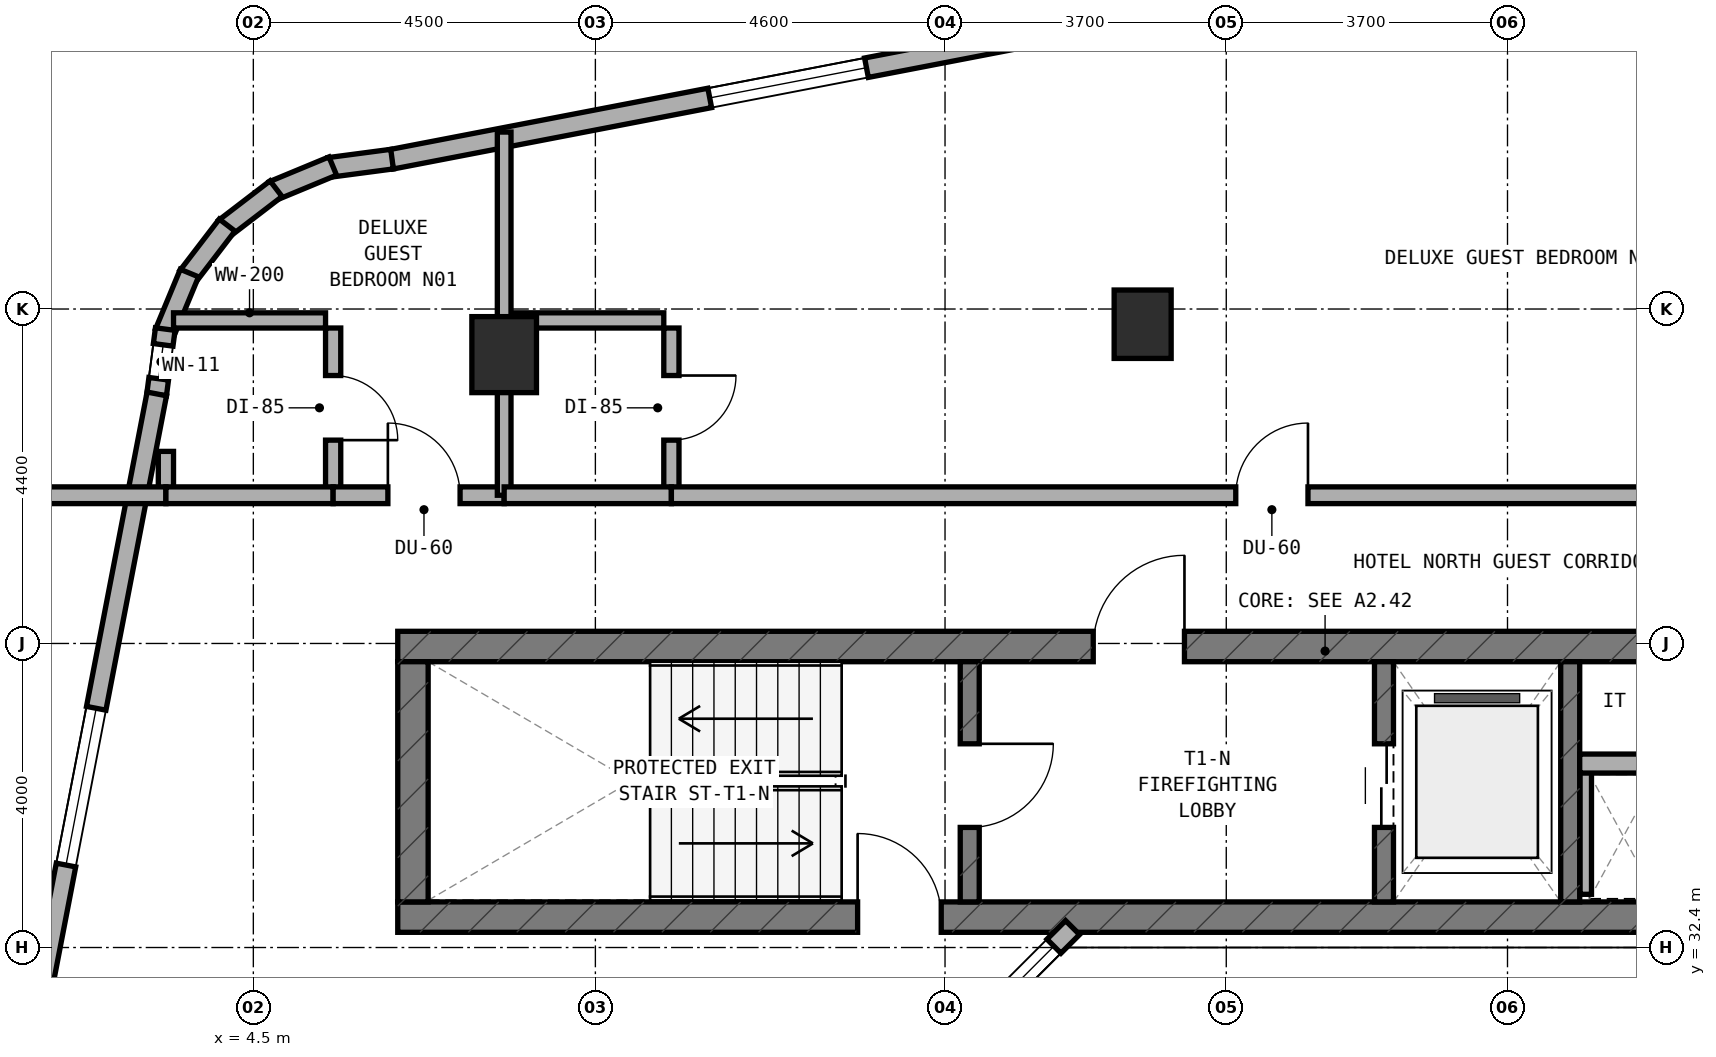
"""IFC4 building model, lengths in metres.
Left out: names, types, materials, properties, quantities, classifications, styles, units other than length and angle.
Written with IfcOpenShell. Run it as: python <this file> out.ifc"""

import sys

from ifc_helpers import new_model, si_unit, direction, frame, frame_2d, origin, origin_2d, place, context, subcontext, project, spatial, rectangle, extrude, element, fill, save


model = new_model("IFC4")
c1 = context("Model", 3, precision=1e-05, world=origin(), true_north=direction((0.0, 1.0)))
c2 = subcontext(c1, "Body", "Model", "MODEL_VIEW")
j1 = project(units=[si_unit("LENGTHUNIT", "METRE"), si_unit("PLANEANGLEUNIT", "RADIAN")], contexts=[c1])
p1 = place(None, origin())
s1 = spatial("IfcSite", under=j1, at=p1, CompositionType="ELEMENT")
p2 = place(p1, origin())
s2 = spatial("IfcBuilding", under=s1, at=p2, CompositionType="ELEMENT")
p3 = place(p2, frame((0.0, 0.0, 191.9)))
s3 = spatial("IfcBuildingStorey", under=s2, at=p3, CompositionType="ELEMENT", Elevation=191.9)
p4 = place(p3, frame((6.4, 32.8, 0.0), z_axis=(0.0, 0.0, 1.0), x_axis=(1.0, 0.0, 0.0)))
e1 = element("IfcWall", 1, at=p4, inside=s3, PredefinedType="SHEAR", context=c2, shape_type="SweptSolid", body=[
    extrude(rectangle(XDim=24.4, YDim=0.4, at=frame_2d((12.2, 0.0))), origin(), (0.0, 0.0, 1.0), 3.6),
])
p5 = place(p4, frame((6.05, 0.0, 0.0)))
e2 = element("IfcOpeningElement", 2, at=p5, cuts=e1, PredefinedType="OPENING", context=c2, shape_type="SweptSolid", body=[
    extrude(rectangle(XDim=1.1, YDim=2.15, at=frame_2d((0.55, 1.075))), frame((0.0, 0.21, 0.0), z_axis=(0.0, -1.0, 0.0), x_axis=(1.0, 0.0, 0.0)), (0.0, 0.0, 1.0), 0.42),
])
p6 = place(p3, frame((6.4, 36.36, 0.0), z_axis=(0.0, 0.0, 1.0), x_axis=(1.0, 0.0, 0.0)))
e3 = element("IfcWall", 3, at=p6, inside=s3, PredefinedType="SHEAR", context=c2, shape_type="SweptSolid", body=[
    extrude(rectangle(XDim=24.4, YDim=0.4, at=frame_2d((12.2, 0.0))), origin(), (0.0, 0.0, 1.0), 3.6),
])
p7 = place(p6, frame((9.15, 0.0, 0.0)))
e4 = element("IfcOpeningElement", 4, at=p7, cuts=e3, PredefinedType="OPENING", context=c2, shape_type="SweptSolid", body=[
    extrude(rectangle(XDim=1.2, YDim=2.15, at=frame_2d((0.6, 1.075))), frame((0.0, 0.21, 0.0), z_axis=(0.0, -1.0, 0.0), x_axis=(1.0, 0.0, 0.0)), (0.0, 0.0, 1.0), 0.42),
])
p8 = place(p6, frame((19.2, 0.0, 0.0)))
e5 = element("IfcOpeningElement", 5, at=p8, cuts=e3, PredefinedType="OPENING", context=c2, shape_type="SweptSolid", body=[
    extrude(rectangle(XDim=0.85, YDim=2.1, at=frame_2d((0.425, 1.05))), frame((0.0, 0.21, 0.0), z_axis=(0.0, -1.0, 0.0), x_axis=(1.0, 0.0, 0.0)), (0.0, 0.0, 1.0), 0.42),
])
p9 = place(p6, frame((16.94, 0.0, 0.0)))
e6 = element("IfcOpeningElement", 6, at=p9, cuts=e3, PredefinedType="OPENING", context=c2, shape_type="SweptSolid", body=[
    extrude(rectangle(XDim=0.85, YDim=2.1, at=frame_2d((0.425, 1.05))), frame((0.0, 0.21, 0.0), z_axis=(0.0, -1.0, 0.0), x_axis=(1.0, 0.0, 0.0)), (0.0, 0.0, 1.0), 0.42),
])
p10 = place(p3, frame((6.6, 33.0, 0.0), z_axis=(0.0, 0.0, 1.0), x_axis=(0.0, 1.0, 0.0)))
e7 = element("IfcWall", 7, at=p10, inside=s3, PredefinedType="SHEAR", context=c2, shape_type="SweptSolid", body=[
    extrude(rectangle(XDim=3.16, YDim=0.4, at=frame_2d((1.58, 0.0))), origin(), (0.0, 0.0, 1.0), 3.6),
])
p11 = place(p3, frame((13.925, 33.0, 0.0), z_axis=(0.0, 0.0, 1.0), x_axis=(0.0, 1.0, 0.0)))
e8 = element("IfcWall", 8, at=p11, inside=s3, PredefinedType="STANDARD", context=c2, shape_type="SweptSolid", body=[
    extrude(rectangle(XDim=3.16, YDim=0.25, at=frame_2d((1.58, 0.0))), origin(), (0.0, 0.0, 1.0), 3.32),
])
p12 = place(p11, frame((0.98, 0.0, 0.0)))
e9 = element("IfcOpeningElement", 9, at=p12, cuts=e8, PredefinedType="OPENING", context=c2, shape_type="SweptSolid", body=[
    extrude(rectangle(XDim=1.1, YDim=2.15, at=frame_2d((0.55, 1.075))), frame((0.0, 0.135, 0.0), z_axis=(0.0, -1.0, 0.0), x_axis=(1.0, 0.0, 0.0)), (0.0, 0.0, 1.0), 0.27),
])
p13 = place(p3, frame((19.375, 33.0, 0.0), z_axis=(0.0, 0.0, 1.0), x_axis=(0.0, 1.0, 0.0)))
e10 = element("IfcWall", 10, at=p13, inside=s3, PredefinedType="STANDARD", context=c2, shape_type="SweptSolid", body=[
    extrude(rectangle(XDim=3.16, YDim=0.25, at=frame_2d((1.58, 0.0))), origin(), (0.0, 0.0, 1.0), 3.32),
])
p14 = place(p13, frame((0.98, 0.0, 0.0)))
e11 = element("IfcOpeningElement", 11, at=p14, cuts=e10, PredefinedType="OPENING", context=c2, shape_type="SweptSolid", body=[
    extrude(rectangle(XDim=1.1, YDim=2.15, at=frame_2d((0.55, 1.075))), frame((0.0, 0.135, 0.0), z_axis=(0.0, -1.0, 0.0), x_axis=(1.0, 0.0, 0.0)), (0.0, 0.0, 1.0), 0.27),
])
p15 = place(p3, frame((21.825, 33.0, 0.0), z_axis=(0.0, 0.0, 1.0), x_axis=(0.0, 1.0, 0.0)))
e12 = element("IfcWall", 12, at=p15, inside=s3, PredefinedType="STANDARD", context=c2, shape_type="SweptSolid", body=[
    extrude(rectangle(XDim=3.16, YDim=0.25, at=frame_2d((1.58, 0.0))), origin(), (0.0, 0.0, 1.0), 3.32),
])
p16 = place(p3, frame((16.2, 40.6, 0.0), z_axis=(0.0, 0.0, 1.0), x_axis=(1.0, 0.0, 0.0)))
e13 = element("IfcColumn", 13, at=p16, inside=s3, PredefinedType="COLUMN", context=c2, shape_type="SweptSolid", body=[
    extrude(rectangle(XDim=0.75, YDim=0.9, at=origin_2d()), origin(), (0.0, 0.0, 1.0), 3.6),
])
p17 = place(p3, frame((7.8, 40.2, 0.0), z_axis=(0.0, 0.0, 1.0), x_axis=(1.0, 0.0, 0.0)))
e14 = element("IfcColumn", 14, at=p17, inside=s3, PredefinedType="COLUMN", context=c2, shape_type="SweptSolid", body=[
    extrude(rectangle(XDim=0.85, YDim=1.0, at=origin_2d()), origin(), (0.0, 0.0, 1.0), 3.6),
])
p18 = place(p3, frame((13.515, 30.899, 0.0), z_axis=(0.0, 0.0, 1.0), x_axis=(0.707106781187, 0.707106781187, 0.0)))
e15 = element("IfcWall", 15, at=p18, inside=s3, PredefinedType="STANDARD", context=c2, shape_type="SweptSolid", body=[
    extrude(rectangle(XDim=2.493, YDim=0.26, at=frame_2d((1.247, 0.0))), origin(), (0.0, 0.0, 1.0), 3.32),
])
p19 = place(p18, frame((0.347, 0.0, 0.85)))
e16 = element("IfcOpeningElement", 16, at=p19, cuts=e15, PredefinedType="OPENING", context=c2, shape_type="SweptSolid", body=[
    extrude(rectangle(XDim=1.8, YDim=1.5, at=frame_2d((0.9, 0.75))), frame((0.0, 0.14, 0.0), z_axis=(0.0, -1.0, 0.0), x_axis=(1.0, 0.0, 0.0)), (0.0, 0.0, 1.0), 0.28),
])
p20 = place(p3, frame((15.199, 44.482, 0.0), z_axis=(0.0, 0.0, 1.0), x_axis=(-0.98192801022, -0.189254809039, 0.0)))
e17 = element("IfcWall", 17, at=p20, inside=s3, PredefinedType="STANDARD", context=c2, shape_type="SweptSolid", body=[
    extrude(rectangle(XDim=9.046, YDim=0.26, at=frame_2d((4.523, 0.0))), origin(), (0.0, 0.0, 1.0), 3.32),
])
p21 = place(p20, frame((2.681, 0.0, 0.85)))
e18 = element("IfcOpeningElement", 18, at=p21, cuts=e17, PredefinedType="OPENING", context=c2, shape_type="SweptSolid", body=[
    extrude(rectangle(XDim=2.1, YDim=1.5, at=frame_2d((1.05, 0.75))), frame((0.0, 0.14, 0.0), z_axis=(0.0, -1.0, 0.0), x_axis=(1.0, 0.0, 0.0)), (0.0, 0.0, 1.0), 0.28),
])
p22 = place(p3, frame((6.325, 42.772, 0.0), z_axis=(0.0, 0.0, 1.0), x_axis=(-0.99142134712, -0.130704676564, 0.0)))
e19 = element("IfcWall", 19, at=p22, inside=s3, PredefinedType="STANDARD", context=c2, shape_type="SweptSolid", body=[
    extrude(rectangle(XDim=0.833, YDim=0.26, at=frame_2d((0.417, 0.0))), origin(), (0.0, 0.0, 1.0), 3.32),
])
p23 = place(p3, frame((5.545, 42.681, 0.0), z_axis=(0.0, 0.0, 1.0), x_axis=(-0.923712395518, -0.383086687796, 0.0)))
e20 = element("IfcWall", 20, at=p23, inside=s3, PredefinedType="STANDARD", context=c2, shape_type="SweptSolid", body=[
    extrude(rectangle(XDim=0.851, YDim=0.26, at=frame_2d((0.425, 0.0))), origin(), (0.0, 0.0, 1.0), 3.32),
])
for number, where, z_axis, x_axis in (
    (21, (4.799, 42.383, 0.0), (0.0, 0.0, 1.0), (-0.794, -0.608, 0.0)),
    (22, (4.155, 41.904, 0.0), (0.0, 0.0, 1.0), (-0.608, -0.794, 0.0)),
):
    element("IfcWall", number, at=place(p3, frame(where, z_axis=z_axis, x_axis=x_axis)), inside=s3, PredefinedType="STANDARD", context=c2, shape_type="SweptSolid", body=[
        extrude(rectangle(XDim=0.85, YDim=0.26, at=frame_2d((0.425, 0.0))), origin(), (0.0, 0.0, 1.0), 3.32),
    ])
p24 = place(p3, frame((3.659, 41.273, 0.0), z_axis=(0.0, 0.0, 1.0), x_axis=(-0.383086687796, -0.923712395518, 0.0)))
e23 = element("IfcWall", 23, at=p24, inside=s3, PredefinedType="STANDARD", context=c2, shape_type="SweptSolid", body=[
    extrude(rectangle(XDim=0.851, YDim=0.26, at=frame_2d((0.425, 0.0))), origin(), (0.0, 0.0, 1.0), 3.32),
])
p25 = place(p3, frame((3.341, 40.536, 0.0), z_axis=(0.0, 0.0, 1.0), x_axis=(-0.130192647656, -0.991488716273, 0.0)))
e24 = element("IfcWall", 24, at=p25, inside=s3, PredefinedType="STANDARD", context=c2, shape_type="SweptSolid", body=[
    extrude(rectangle(XDim=0.868, YDim=0.26, at=frame_2d((0.434, 0.0))), origin(), (0.0, 0.0, 1.0), 3.32),
])
p26 = place(p25, frame((0.209, 0.0, 0.85)))
e25 = element("IfcOpeningElement", 25, at=p26, cuts=e24, PredefinedType="OPENING", context=c2, shape_type="SweptSolid", body=[
    extrude(rectangle(XDim=0.45, YDim=1.5, at=frame_2d((0.225, 0.75))), frame((0.0, 0.14, 0.0), z_axis=(0.0, -1.0, 0.0), x_axis=(1.0, 0.0, 0.0)), (0.0, 0.0, 1.0), 0.28),
])
p27 = place(p3, frame((3.23, 39.683, 0.0), z_axis=(0.0, 0.0, 1.0), x_axis=(-0.189254809039, -0.98192801022, 0.0)))
e26 = element("IfcWall", 26, at=p27, inside=s3, PredefinedType="STANDARD", context=c2, shape_type="SweptSolid", body=[
    extrude(rectangle(XDim=9.046, YDim=0.26, at=frame_2d((4.523, 0.0))), origin(), (0.0, 0.0, 1.0), 3.32),
])
p28 = place(p27, frame((4.212, 0.0, 0.85)))
e27 = element("IfcOpeningElement", 27, at=p28, cuts=e26, PredefinedType="OPENING", context=c2, shape_type="SweptSolid", body=[
    extrude(rectangle(XDim=2.1, YDim=1.5, at=frame_2d((1.05, 0.75))), frame((0.0, 0.14, 0.0), z_axis=(0.0, -1.0, 0.0), x_axis=(1.0, 0.0, 0.0)), (0.0, 0.0, 1.0), 0.28),
])
p29 = place(p3, frame((22.03, 33.1, 0.0), z_axis=(0.0, 0.0, 1.0), x_axis=(0.0, 1.0, 0.0)))
e28 = element("IfcWall", 28, at=p29, inside=s3, PredefinedType="PARTITIONING", context=c2, shape_type="SweptSolid", body=[
    extrude(rectangle(XDim=1.62, YDim=0.15, at=frame_2d((0.81, 0.0))), origin(), (0.0, 0.0, 1.0), 3.32),
])
p30 = place(p3, frame((21.95, 34.82, 0.0), z_axis=(0.0, 0.0, 1.0), x_axis=(1.0, 0.0, 0.0)))
e29 = element("IfcWall", 29, at=p30, inside=s3, PredefinedType="SOLIDWALL", context=c2, shape_type="SweptSolid", body=[
    extrude(rectangle(XDim=1.15, YDim=0.25, at=frame_2d((0.575, 0.0))), origin(), (0.0, 0.0, 1.0), 3.32),
])
p31 = place(p3, frame((5.55, 38.45, 0.0), z_axis=(0.0, 0.0, 1.0), x_axis=(0.0, 1.0, 0.0)))
e30 = element("IfcWall", 30, at=p31, inside=s3, PredefinedType="PLUMBINGWALL", context=c2, shape_type="SweptSolid", body=[
    extrude(rectangle(XDim=2.1, YDim=0.2, at=frame_2d((1.05, 0.0))), origin(), (0.0, 0.0, 1.0), 3.32),
])
p32 = place(p31, frame((0.625, 0.0, 0.0)))
e31 = element("IfcOpeningElement", 31, at=p32, cuts=e30, PredefinedType="OPENING", context=c2, shape_type="SweptSolid", body=[
    extrude(rectangle(XDim=0.85, YDim=2.1, at=frame_2d((0.425, 1.05))), frame((0.0, 0.11, 0.0), z_axis=(0.0, -1.0, 0.0), x_axis=(1.0, 0.0, 0.0)), (0.0, 0.0, 1.0), 0.22),
])
p33 = place(p3, frame((3.45, 40.65, 0.0), z_axis=(0.0, 0.0, 1.0), x_axis=(1.0, 0.0, 0.0)))
e32 = element("IfcWall", 32, at=p33, inside=s3, PredefinedType="PLUMBINGWALL", context=c2, shape_type="SweptSolid", body=[
    extrude(rectangle(XDim=2.0, YDim=0.2, at=frame_2d((1.0, 0.0))), origin(), (0.0, 0.0, 1.0), 3.32),
])
p34 = place(p3, frame((3.35, 38.35, 0.0), z_axis=(0.0, 0.0, 1.0), x_axis=(0.0, 1.0, 0.0)))
e33 = element("IfcWall", 33, at=p34, inside=s3, PredefinedType="PLUMBINGWALL", context=c2, shape_type="SweptSolid", body=[
    extrude(rectangle(XDim=0.577, YDim=0.2, at=frame_2d((0.289, 0.0))), origin(), (0.0, 0.0, 1.0), 3.32),
])
p35 = place(p3, frame((1.56, 38.35, 0.0), z_axis=(0.0, 0.0, 1.0), x_axis=(1.0, 0.0, 0.0)))
e34 = element("IfcWall", 34, at=p35, inside=s3, PredefinedType="SOLIDWALL", context=c2, shape_type="SweptSolid", body=[
    extrude(rectangle(XDim=1.79, YDim=0.22, at=frame_2d((0.895, 0.0))), origin(), (0.0, 0.0, 1.0), 3.32),
])
p36 = place(p3, frame((3.35, 38.35, 0.0), z_axis=(0.0, 0.0, 1.0), x_axis=(1.0, 0.0, 0.0)))
e35 = element("IfcWall", 35, at=p36, inside=s3, PredefinedType="SOLIDWALL", context=c2, shape_type="SweptSolid", body=[
    extrude(rectangle(XDim=2.2, YDim=0.22, at=frame_2d((1.1, 0.0))), origin(), (0.0, 0.0, 1.0), 3.32),
])
p37 = place(p3, frame((5.55, 38.35, 0.0), z_axis=(0.0, 0.0, 1.0), x_axis=(1.0, 0.0, 0.0)))
e36 = element("IfcWall", 36, at=p37, inside=s3, PredefinedType="SOLIDWALL", context=c2, shape_type="SweptSolid", body=[
    extrude(rectangle(XDim=2.25, YDim=0.22, at=frame_2d((1.125, 0.0))), origin(), (0.0, 0.0, 1.0), 2.995),
])
p38 = place(p37, frame((0.72, 0.0, 0.0)))
e37 = element("IfcOpeningElement", 37, at=p38, cuts=e36, PredefinedType="OPENING", context=c2, shape_type="SweptSolid", body=[
    extrude(rectangle(XDim=0.95, YDim=2.1, at=frame_2d((0.475, 1.05))), frame((0.0, 0.12, 0.0), z_axis=(0.0, -1.0, 0.0), x_axis=(1.0, 0.0, 0.0)), (0.0, 0.0, 1.0), 0.24),
])
p39 = place(p3, frame((7.8, 38.35, 0.0), z_axis=(0.0, 0.0, 1.0), x_axis=(0.0, 1.0, 0.0)))
e38 = element("IfcWall", 38, at=p39, inside=s3, PredefinedType="SOLIDWALL", context=c2, shape_type="SweptSolid", body=[
    extrude(rectangle(XDim=4.778, YDim=0.18, at=frame_2d((2.389, 0.0))), origin(), (0.0, 0.0, 1.0), 2.935),
])
p40 = place(p3, frame((10.0, 38.45, 0.0), z_axis=(0.0, 0.0, 1.0), x_axis=(0.0, 1.0, 0.0)))
e39 = element("IfcWall", 39, at=p40, inside=s3, PredefinedType="PLUMBINGWALL", context=c2, shape_type="SweptSolid", body=[
    extrude(rectangle(XDim=2.1, YDim=0.2, at=frame_2d((1.05, 0.0))), origin(), (0.0, 0.0, 1.0), 2.935),
])
p41 = place(p40, frame((0.625, 0.0, 0.0)))
e40 = element("IfcOpeningElement", 40, at=p41, cuts=e39, PredefinedType="OPENING", context=c2, shape_type="SweptSolid", body=[
    extrude(rectangle(XDim=0.85, YDim=2.1, at=frame_2d((0.425, 1.05))), frame((0.0, 0.11, 0.0), z_axis=(0.0, -1.0, 0.0), x_axis=(1.0, 0.0, 0.0)), (0.0, 0.0, 1.0), 0.22),
])
p42 = place(p3, frame((7.9, 40.65, 0.0), z_axis=(0.0, 0.0, 1.0), x_axis=(1.0, 0.0, 0.0)))
e41 = element("IfcWall", 41, at=p42, inside=s3, PredefinedType="PLUMBINGWALL", context=c2, shape_type="SweptSolid", body=[
    extrude(rectangle(XDim=2.0, YDim=0.2, at=frame_2d((1.0, 0.0))), origin(), (0.0, 0.0, 1.0), 3.32),
])
p43 = place(p3, frame((7.8, 38.35, 0.0), z_axis=(0.0, 0.0, 1.0), x_axis=(1.0, 0.0, 0.0)))
e42 = element("IfcWall", 42, at=p43, inside=s3, PredefinedType="SOLIDWALL", context=c2, shape_type="SweptSolid", body=[
    extrude(rectangle(XDim=2.2, YDim=0.22, at=frame_2d((1.1, 0.0))), origin(), (0.0, 0.0, 1.0), 2.995),
])
p44 = place(p3, frame((10.0, 38.35, 0.0), z_axis=(0.0, 0.0, 1.0), x_axis=(1.0, 0.0, 0.0)))
e43 = element("IfcWall", 43, at=p44, inside=s3, PredefinedType="SOLIDWALL", context=c2, shape_type="SweptSolid", body=[
    extrude(rectangle(XDim=15.8, YDim=0.22, at=frame_2d((7.9, 0.0))), origin(), (0.0, 0.0, 1.0), 2.995),
])
p45 = place(p44, frame((7.425, 0.0, 0.0)))
e44 = element("IfcOpeningElement", 44, at=p45, cuts=e43, PredefinedType="OPENING", context=c2, shape_type="SweptSolid", body=[
    extrude(rectangle(XDim=0.95, YDim=2.1, at=frame_2d((0.475, 1.05))), frame((0.0, 0.12, 0.0), z_axis=(0.0, -1.0, 0.0), x_axis=(1.0, 0.0, 0.0)), (0.0, 0.0, 1.0), 0.24),
])
p46 = place(p19, origin())
e45 = element("IfcWindow", 45, at=p46, inside=s3, PartitioningType="SINGLE_PANEL", PredefinedType="WINDOW", context=c2, shape_type="SweptSolid", body=[
    extrude(rectangle(XDim=1.8, YDim=1.5, at=frame_2d((0.9, 0.75))), frame((0.0, 0.03, 0.0), z_axis=(0.0, -1.0, 0.0), x_axis=(1.0, 0.0, 0.0)), (0.0, 0.0, 1.0), 0.06),
])
fill(e16, e45)
p47 = place(p21, origin())
e46 = element("IfcWindow", 46, at=p47, inside=s3, PartitioningType="SINGLE_PANEL", PredefinedType="WINDOW", context=c2, shape_type="SweptSolid", body=[
    extrude(rectangle(XDim=2.1, YDim=1.5, at=frame_2d((1.05, 0.75))), frame((0.0, 0.03, 0.0), z_axis=(0.0, -1.0, 0.0), x_axis=(1.0, 0.0, 0.0)), (0.0, 0.0, 1.0), 0.06),
])
fill(e18, e46)
p48 = place(p28, origin())
e47 = element("IfcWindow", 47, at=p48, inside=s3, PartitioningType="SINGLE_PANEL", PredefinedType="WINDOW", context=c2, shape_type="SweptSolid", body=[
    extrude(rectangle(XDim=2.1, YDim=1.5, at=frame_2d((1.05, 0.75))), frame((0.0, 0.03, 0.0), z_axis=(0.0, -1.0, 0.0), x_axis=(1.0, 0.0, 0.0)), (0.0, 0.0, 1.0), 0.06),
])
fill(e27, e47)
p49 = place(p26, origin())
e48 = element("IfcWindow", 48, at=p49, inside=s3, PartitioningType="SINGLE_PANEL", PredefinedType="WINDOW", context=c2, shape_type="SweptSolid", body=[
    extrude(rectangle(XDim=0.45, YDim=1.5, at=frame_2d((0.225, 0.75))), frame((0.0, 0.03, 0.0), z_axis=(0.0, -1.0, 0.0), x_axis=(1.0, 0.0, 0.0)), (0.0, 0.0, 1.0), 0.06),
])
fill(e25, e48)
p50 = place(p12, frame((1.1, 0.0, 0.0), z_axis=(0.0, 0.0, 1.0), x_axis=(-1.0, 0.0, 0.0)))
e49 = element("IfcDoor", 49, at=p50, inside=s3, OperationType="SINGLE_SWING_LEFT", PredefinedType="DOOR", context=c2, shape_type="SweptSolid", body=[
    extrude(rectangle(XDim=1.1, YDim=2.15, at=frame_2d((0.55, 1.075))), frame((0.0, 0.025, 0.0), z_axis=(0.0, -1.0, 0.0), x_axis=(1.0, 0.0, 0.0)), (0.0, 0.0, 1.0), 0.05),
])
fill(e9, e49)
p51 = place(p7, origin())
e50 = element("IfcDoor", 50, at=p51, inside=s3, OperationType="SINGLE_SWING_RIGHT", PredefinedType="DOOR", context=c2, shape_type="SweptSolid", body=[
    extrude(rectangle(XDim=1.2, YDim=2.15, at=frame_2d((0.6, 1.075))), frame((0.0, 0.025, 0.0), z_axis=(0.0, -1.0, 0.0), x_axis=(1.0, 0.0, 0.0)), (0.0, 0.0, 1.0), 0.05),
])
fill(e4, e50)
p52 = place(p14, origin())
e51 = element("IfcDoor", 51, at=p52, inside=s3, OperationType="DOUBLE_DOOR_SLIDING", PredefinedType="DOOR", context=c2, shape_type="SweptSolid", body=[
    extrude(rectangle(XDim=1.1, YDim=2.15, at=frame_2d((0.55, 1.075))), frame((0.0, 0.025, 0.0), z_axis=(0.0, -1.0, 0.0), x_axis=(1.0, 0.0, 0.0)), (0.0, 0.0, 1.0), 0.05),
])
fill(e11, e51)
p53 = place(p5, origin())
e52 = element("IfcDoor", 52, at=p53, inside=s3, OperationType="SINGLE_SWING_LEFT", PredefinedType="DOOR", context=c2, shape_type="SweptSolid", body=[
    extrude(rectangle(XDim=1.1, YDim=2.15, at=frame_2d((0.55, 1.075))), frame((0.0, 0.025, 0.0), z_axis=(0.0, -1.0, 0.0), x_axis=(1.0, 0.0, 0.0)), (0.0, 0.0, 1.0), 0.05),
])
fill(e2, e52)
p54 = place(p32, frame((0.85, 0.0, 0.0), z_axis=(0.0, 0.0, 1.0), x_axis=(-1.0, 0.0, 0.0)))
e53 = element("IfcDoor", 53, at=p54, inside=s3, OperationType="SINGLE_SWING_RIGHT", PredefinedType="DOOR", context=c2, shape_type="SweptSolid", body=[
    extrude(rectangle(XDim=0.85, YDim=2.1, at=frame_2d((0.425, 1.05))), frame((0.0, 0.025, 0.0), z_axis=(0.0, -1.0, 0.0), x_axis=(1.0, 0.0, 0.0)), (0.0, 0.0, 1.0), 0.05),
])
fill(e31, e53)
p55 = place(p38, origin())
e54 = element("IfcDoor", 54, at=p55, inside=s3, OperationType="SINGLE_SWING_LEFT", PredefinedType="DOOR", context=c2, shape_type="SweptSolid", body=[
    extrude(rectangle(XDim=0.95, YDim=2.1, at=frame_2d((0.475, 1.05))), frame((0.0, 0.025, 0.0), z_axis=(0.0, -1.0, 0.0), x_axis=(1.0, 0.0, 0.0)), (0.0, 0.0, 1.0), 0.05),
])
fill(e37, e54)
p56 = place(p41, frame((0.85, 0.0, 0.0), z_axis=(0.0, 0.0, 1.0), x_axis=(-1.0, 0.0, 0.0)))
e55 = element("IfcDoor", 55, at=p56, inside=s3, OperationType="SINGLE_SWING_LEFT", PredefinedType="DOOR", context=c2, shape_type="SweptSolid", body=[
    extrude(rectangle(XDim=0.85, YDim=2.1, at=frame_2d((0.425, 1.05))), frame((0.0, 0.025, 0.0), z_axis=(0.0, -1.0, 0.0), x_axis=(1.0, 0.0, 0.0)), (0.0, 0.0, 1.0), 0.05),
])
fill(e40, e55)
p57 = place(p45, origin())
e56 = element("IfcDoor", 56, at=p57, inside=s3, OperationType="SINGLE_SWING_RIGHT", PredefinedType="DOOR", context=c2, shape_type="SweptSolid", body=[
    extrude(rectangle(XDim=0.95, YDim=2.1, at=frame_2d((0.475, 1.05))), frame((0.0, 0.025, 0.0), z_axis=(0.0, -1.0, 0.0), x_axis=(1.0, 0.0, 0.0)), (0.0, 0.0, 1.0), 0.05),
])
fill(e44, e56)
save(model, sys.argv[1])
